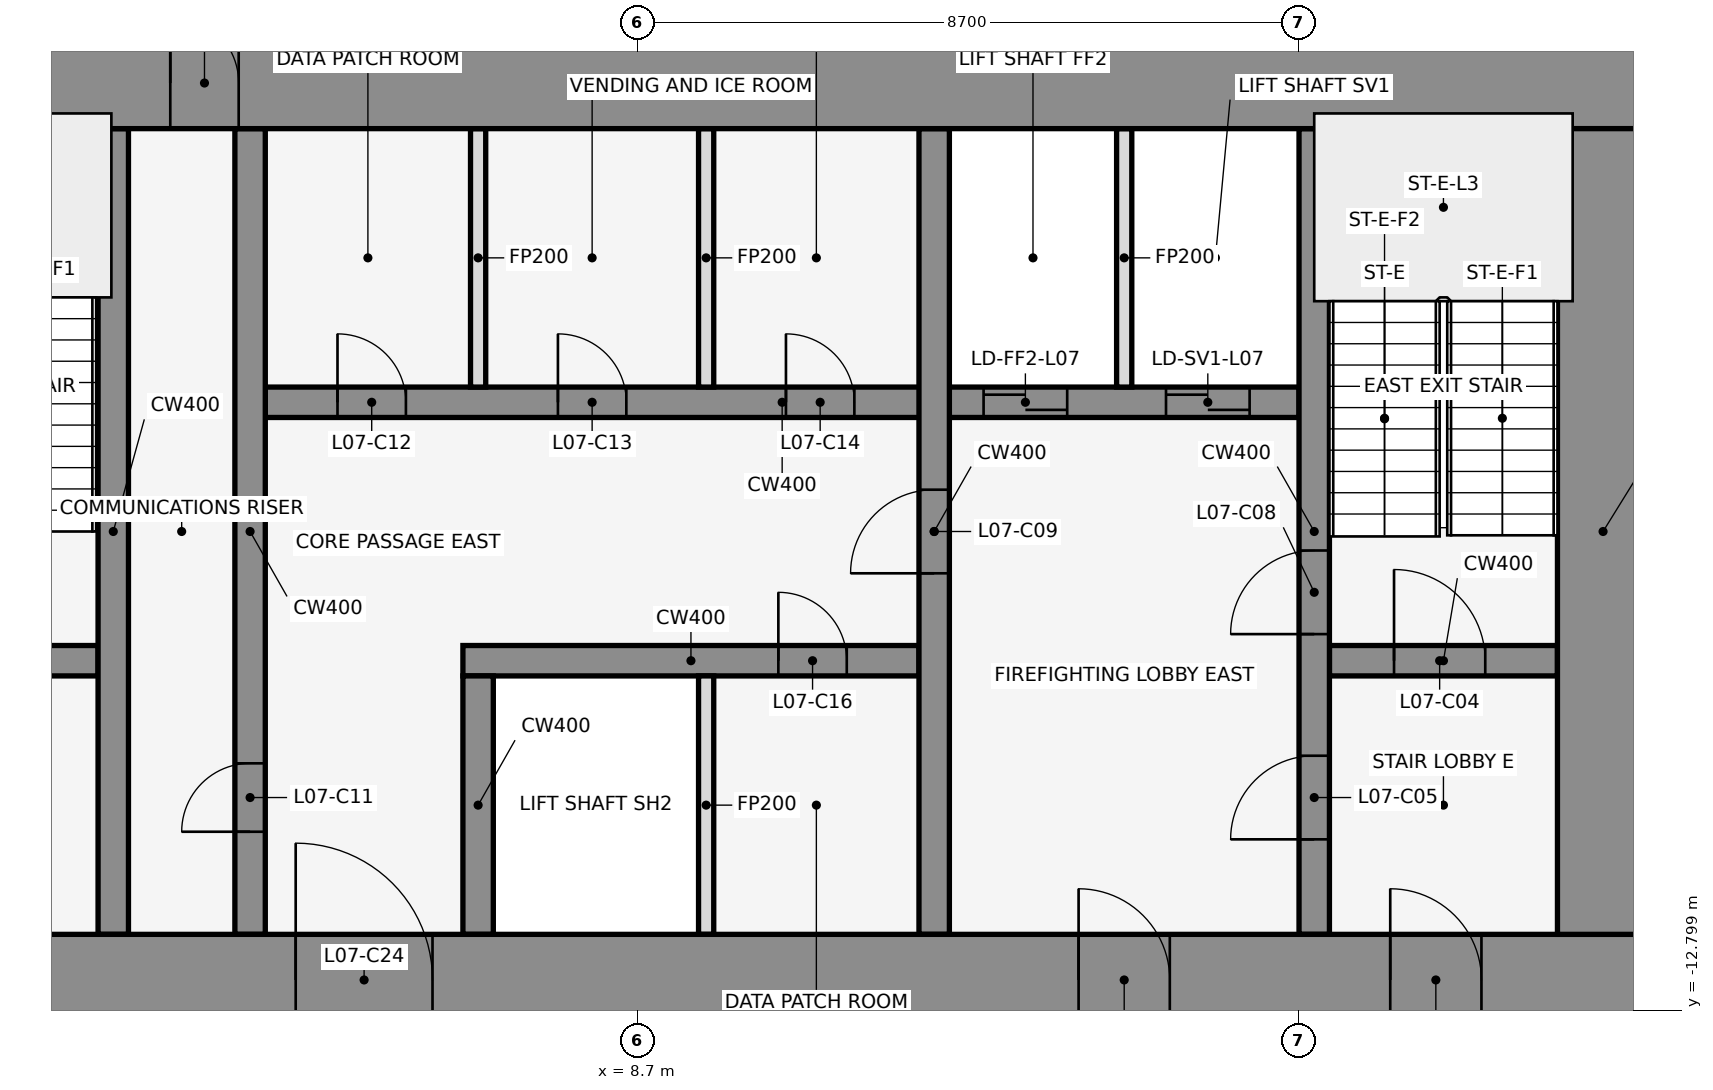
"""IFC4 building model, lengths in metres.
Left out: names, types, materials, properties, quantities, classifications, styles, units other than length and angle.
Written with IfcOpenShell. Run it as: python <this file> out.ifc"""

import sys

from ifc_helpers import new_model, si_unit, direction, frame, frame_2d, origin, place, context, subcontext, project, spatial, rectangle, extrude, element, fill, save


model = new_model("IFC4")
c1 = context("Model", 3, precision=1e-05, world=origin(), true_north=direction((0.0, 1.0)))
c2 = subcontext(c1, "Body", "Model", "MODEL_VIEW")
j1 = project(units=[si_unit("LENGTHUNIT", "METRE"), si_unit("PLANEANGLEUNIT", "RADIAN")], contexts=[c1])
p1 = place(None, origin())
s1 = spatial("IfcSite", under=j1, at=p1, CompositionType="ELEMENT")
p2 = place(p1, origin())
s2 = spatial("IfcBuilding", under=s1, at=p2, CompositionType="ELEMENT")
p3 = place(p2, frame((0.0, 0.0, 39.5)))
s3 = spatial("IfcBuildingStorey", under=s2, at=p3, CompositionType="ELEMENT", Elevation=39.5)
for number, where, z_axis, x_axis in (
    (1, (16.432, -0.105, 0.0), (0.0, 0.0, 1.0), (-0.84, 0.543, 0.0)),
    (2, (1.901, 1.08, 0.0), (0.0, 0.0, 1.0), (-0.84, -0.543, 0.0)),
):
    element("IfcWall", number, at=place(p3, frame(where, z_axis=z_axis, x_axis=x_axis)), inside=s3, PredefinedType="STANDARD", context=c2, shape_type="SweptSolid", body=[
        extrude(rectangle(XDim=2.183, YDim=0.25, at=frame_2d((1.091, 0.0))), origin(), (0.0, 0.0, 1.0), 4.35),
    ])
p4 = place(p3, frame((-1.6, -8.2, 0.0), z_axis=(0.0, 0.0, 1.0), x_axis=(1.0, 0.0, 0.0)))
e3 = element("IfcWall", 3, at=p4, inside=s3, PredefinedType="SHEAR", context=c2, shape_type="SweptSolid", body=[
    extrude(rectangle(XDim=3.2, YDim=0.4, at=frame_2d((1.6, 0.0))), origin(), (0.0, 0.0, 1.0), 4.5),
])
p5 = place(p4, frame((1.05, 0.0, 0.0)))
e4 = element("IfcOpeningElement", 4, at=p5, cuts=e3, PredefinedType="OPENING", context=c2, shape_type="SweptSolid", body=[
    extrude(rectangle(XDim=1.2, YDim=2.1, at=frame_2d((0.6, 1.05))), frame((0.0, 0.212, 0.0), z_axis=(0.0, -1.0, 0.0), x_axis=(1.0, 0.0, 0.0)), (0.0, 0.0, 1.0), 0.424),
])
p6 = place(p3, frame((6.4, -8.2, 0.0), z_axis=(0.0, 0.0, 1.0), x_axis=(1.0, 0.0, 0.0)))
e5 = element("IfcWall", 5, at=p6, inside=s3, PredefinedType="SHEAR", context=c2, shape_type="SweptSolid", body=[
    extrude(rectangle(XDim=6.0, YDim=0.4, at=frame_2d((3.0, 0.0))), origin(), (0.0, 0.0, 1.0), 4.5),
])
p7 = place(p6, frame((4.15, 0.0, 0.0)))
e6 = element("IfcOpeningElement", 6, at=p7, cuts=e5, PredefinedType="OPENING", context=c2, shape_type="SweptSolid", body=[
    extrude(rectangle(XDim=0.9, YDim=2.1, at=frame_2d((0.45, 1.05))), frame((0.0, 0.212, 0.0), z_axis=(0.0, -1.0, 0.0), x_axis=(1.0, 0.0, 0.0)), (0.0, 0.0, 1.0), 0.424),
])
p8 = place(p3, frame((17.8, -8.2, 0.0), z_axis=(0.0, 0.0, 1.0), x_axis=(1.0, 0.0, 0.0)))
e7 = element("IfcWall", 7, at=p8, inside=s3, PredefinedType="SHEAR", context=c2, shape_type="SweptSolid", body=[
    extrude(rectangle(XDim=3.0, YDim=0.4, at=frame_2d((1.5, 0.0))), origin(), (0.0, 0.0, 1.0), 4.5),
])
p9 = place(p8, frame((0.85, 0.0, 0.0)))
e8 = element("IfcOpeningElement", 8, at=p9, cuts=e7, PredefinedType="OPENING", context=c2, shape_type="SweptSolid", body=[
    extrude(rectangle(XDim=1.2, YDim=2.1, at=frame_2d((0.6, 1.05))), frame((0.0, 0.212, 0.0), z_axis=(0.0, -1.0, 0.0), x_axis=(1.0, 0.0, 0.0)), (0.0, 0.0, 1.0), 0.424),
])
p10 = place(p3, frame((3.8, -4.8, 0.0), z_axis=(0.0, 0.0, 1.0), x_axis=(1.0, 0.0, 0.0)))
e9 = element("IfcWall", 9, at=p10, inside=s3, PredefinedType="SHEAR", context=c2, shape_type="SweptSolid", body=[
    extrude(rectangle(XDim=13.6, YDim=0.4, at=frame_2d((6.8, 0.0))), origin(), (0.0, 0.0, 1.0), 4.5),
])
p11 = place(p10, frame((9.45, 0.0, 0.0)))
e10 = element("IfcOpeningElement", 10, at=p11, cuts=e9, PredefinedType="OPENING", context=c2, shape_type="SweptSolid", body=[
    extrude(rectangle(XDim=1.1, YDim=2.1, at=frame_2d((0.55, 1.05))), frame((0.0, 0.212, 0.0), z_axis=(0.0, -1.0, 0.0), x_axis=(1.0, 0.0, 0.0)), (0.0, 0.0, 1.0), 0.424),
])
p12 = place(p10, frame((11.85, 0.0, 0.0)))
e11 = element("IfcOpeningElement", 11, at=p12, cuts=e9, PredefinedType="OPENING", context=c2, shape_type="SweptSolid", body=[
    extrude(rectangle(XDim=1.1, YDim=2.1, at=frame_2d((0.55, 1.05))), frame((0.0, 0.212, 0.0), z_axis=(0.0, -1.0, 0.0), x_axis=(1.0, 0.0, 0.0)), (0.0, 0.0, 1.0), 0.424),
])
p13 = place(p10, frame((0.95, 0.0, 0.0)))
e12 = element("IfcOpeningElement", 12, at=p13, cuts=e9, PredefinedType="OPENING", context=c2, shape_type="SweptSolid", body=[
    extrude(rectangle(XDim=0.9, YDim=2.1, at=frame_2d((0.45, 1.05))), frame((0.0, 0.212, 0.0), z_axis=(0.0, -1.0, 0.0), x_axis=(1.0, 0.0, 0.0)), (0.0, 0.0, 1.0), 0.424),
])
p14 = place(p10, frame((3.85, 0.0, 0.0)))
e13 = element("IfcOpeningElement", 13, at=p14, cuts=e9, PredefinedType="OPENING", context=c2, shape_type="SweptSolid", body=[
    extrude(rectangle(XDim=0.9, YDim=2.1, at=frame_2d((0.45, 1.05))), frame((0.0, 0.212, 0.0), z_axis=(0.0, -1.0, 0.0), x_axis=(1.0, 0.0, 0.0)), (0.0, 0.0, 1.0), 0.424),
])
p15 = place(p10, frame((6.85, 0.0, 0.0)))
e14 = element("IfcOpeningElement", 14, at=p15, cuts=e9, PredefinedType="OPENING", context=c2, shape_type="SweptSolid", body=[
    extrude(rectangle(XDim=0.9, YDim=2.1, at=frame_2d((0.45, 1.05))), frame((0.0, 0.212, 0.0), z_axis=(0.0, -1.0, 0.0), x_axis=(1.0, 0.0, 0.0)), (0.0, 0.0, 1.0), 0.424),
])
p16 = place(p3, frame((1.8, -11.8, 0.0), z_axis=(0.0, 0.0, 1.0), x_axis=(0.0, 1.0, 0.0)))
e15 = element("IfcWall", 15, at=p16, inside=s3, PredefinedType="SHEAR", context=c2, shape_type="SweptSolid", body=[
    extrude(rectangle(XDim=10.6, YDim=0.4, at=frame_2d((5.3, 0.0))), origin(), (0.0, 0.0, 1.0), 4.5),
])
p17 = place(p3, frame((3.6, -11.8, 0.0), z_axis=(0.0, 0.0, 1.0), x_axis=(0.0, 1.0, 0.0)))
e16 = element("IfcWall", 16, at=p17, inside=s3, PredefinedType="SHEAR", context=c2, shape_type="SweptSolid", body=[
    extrude(rectangle(XDim=10.6, YDim=0.4, at=frame_2d((5.3, 0.0))), origin(), (0.0, 0.0, 1.0), 4.5),
])
p18 = place(p17, frame((1.35, 0.0, 0.0)))
e17 = element("IfcOpeningElement", 17, at=p18, cuts=e16, PredefinedType="OPENING", context=c2, shape_type="SweptSolid", body=[
    extrude(rectangle(XDim=0.9, YDim=2.1, at=frame_2d((0.45, 1.05))), frame((0.0, 0.212, 0.0), z_axis=(0.0, -1.0, 0.0), x_axis=(1.0, 0.0, 0.0)), (0.0, 0.0, 1.0), 0.424),
])
p19 = place(p3, frame((6.6, -11.8, 0.0), z_axis=(0.0, 0.0, 1.0), x_axis=(0.0, 1.0, 0.0)))
e18 = element("IfcWall", 18, at=p19, inside=s3, PredefinedType="SHEAR", context=c2, shape_type="SweptSolid", body=[
    extrude(rectangle(XDim=3.4, YDim=0.4, at=frame_2d((1.7, 0.0))), origin(), (0.0, 0.0, 1.0), 4.5),
])
for number, where, z_axis, x_axis in (
    (19, (6.6, -4.6, 0.0), (0.0, 0.0, 1.0), (0.0, 1.0, 0.0)),
    (20, (9.6, -11.8, 0.0), (0.0, 0.0, 1.0), (0.0, 1.0, 0.0)),
    (21, (9.6, -4.6, 0.0), (0.0, 0.0, 1.0), (0.0, 1.0, 0.0)),
):
    element("IfcWall", number, at=place(p3, frame(where, z_axis=z_axis, x_axis=x_axis)), inside=s3, PredefinedType="PARTITIONING", context=c2, shape_type="SweptSolid", body=[
        extrude(rectangle(XDim=3.4, YDim=0.2, at=frame_2d((1.7, 0.0))), origin(), (0.0, 0.0, 1.0), 3.418),
    ])
p20 = place(p3, frame((12.6, -11.8, 0.0), z_axis=(0.0, 0.0, 1.0), x_axis=(0.0, 1.0, 0.0)))
e22 = element("IfcWall", 22, at=p20, inside=s3, PredefinedType="SHEAR", context=c2, shape_type="SweptSolid", body=[
    extrude(rectangle(XDim=10.6, YDim=0.4, at=frame_2d((5.3, 0.0))), origin(), (0.0, 0.0, 1.0), 4.5),
])
p21 = place(p20, frame((4.75, 0.0, 0.0)))
e23 = element("IfcOpeningElement", 23, at=p21, cuts=e22, PredefinedType="OPENING", context=c2, shape_type="SweptSolid", body=[
    extrude(rectangle(XDim=1.1, YDim=2.1, at=frame_2d((0.55, 1.05))), frame((0.0, 0.212, 0.0), z_axis=(0.0, -1.0, 0.0), x_axis=(1.0, 0.0, 0.0)), (0.0, 0.0, 1.0), 0.424),
])
p22 = place(p3, frame((15.1, -4.6, 0.0), z_axis=(0.0, 0.0, 1.0), x_axis=(0.0, 1.0, 0.0)))
e24 = element("IfcWall", 24, at=p22, inside=s3, PredefinedType="PARTITIONING", context=c2, shape_type="SweptSolid", body=[
    extrude(rectangle(XDim=3.4, YDim=0.2, at=frame_2d((1.7, 0.0))), origin(), (0.0, 0.0, 1.0), 3.418),
])
p23 = place(p3, frame((17.6, -11.8, 0.0), z_axis=(0.0, 0.0, 1.0), x_axis=(0.0, 1.0, 0.0)))
e25 = element("IfcWall", 25, at=p23, inside=s3, PredefinedType="SHEAR", context=c2, shape_type="SweptSolid", body=[
    extrude(rectangle(XDim=10.6, YDim=0.4, at=frame_2d((5.3, 0.0))), origin(), (0.0, 0.0, 1.0), 4.5),
])
p24 = place(p23, frame((1.25, 0.0, 0.0)))
e26 = element("IfcOpeningElement", 26, at=p24, cuts=e25, PredefinedType="OPENING", context=c2, shape_type="SweptSolid", body=[
    extrude(rectangle(XDim=1.1, YDim=2.1, at=frame_2d((0.55, 1.05))), frame((0.0, 0.212, 0.0), z_axis=(0.0, -1.0, 0.0), x_axis=(1.0, 0.0, 0.0)), (0.0, 0.0, 1.0), 0.424),
])
p25 = place(p23, frame((3.95, 0.0, 0.0)))
e27 = element("IfcOpeningElement", 27, at=p25, cuts=e25, PredefinedType="OPENING", context=c2, shape_type="SweptSolid", body=[
    extrude(rectangle(XDim=1.1, YDim=2.1, at=frame_2d((0.55, 1.05))), frame((0.0, 0.212, 0.0), z_axis=(0.0, -1.0, 0.0), x_axis=(1.0, 0.0, 0.0)), (0.0, 0.0, 1.0), 0.424),
])
p26 = place(p3, frame((-22.0, -0.6, 0.0), z_axis=(0.0, 0.0, 1.0), x_axis=(1.0, 0.0, 0.0)))
e28 = element("IfcWall", 28, at=p26, inside=s3, PredefinedType="SHEAR", context=c2, shape_type="SweptSolid", body=[
    extrude(rectangle(XDim=44.0, YDim=1.2, at=frame_2d((22.0, 0.0))), origin(), (0.0, 0.0, 1.0), 4.5),
])
p27 = place(p26, frame((18.55, 0.0, 0.0)))
e29 = element("IfcOpeningElement", 29, at=p27, cuts=e28, PredefinedType="OPENING", context=c2, shape_type="SweptSolid", body=[
    extrude(rectangle(XDim=0.9, YDim=2.1, at=frame_2d((0.45, 1.05))), frame((0.0, 0.612, 0.0), z_axis=(0.0, -1.0, 0.0), x_axis=(1.0, 0.0, 0.0)), (0.0, 0.0, 1.0), 1.224),
])
p28 = place(p26, frame((24.55, 0.0, 0.0)))
e30 = element("IfcOpeningElement", 30, at=p28, cuts=e28, PredefinedType="OPENING", context=c2, shape_type="SweptSolid", body=[
    extrude(rectangle(XDim=0.9, YDim=2.1, at=frame_2d((0.45, 1.05))), frame((0.0, 0.612, 0.0), z_axis=(0.0, -1.0, 0.0), x_axis=(1.0, 0.0, 0.0)), (0.0, 0.0, 1.0), 1.224),
])
p29 = place(p3, frame((-22.0, -12.4, 0.0), z_axis=(0.0, 0.0, 1.0), x_axis=(1.0, 0.0, 0.0)))
e31 = element("IfcWall", 31, at=p29, inside=s3, PredefinedType="SHEAR", context=c2, shape_type="SweptSolid", body=[
    extrude(rectangle(XDim=44.0, YDim=1.2, at=frame_2d((22.0, 0.0))), origin(), (0.0, 0.0, 1.0), 4.5),
])
p30 = place(p29, frame((2.2, 0.0, 0.0)))
e32 = element("IfcOpeningElement", 32, at=p30, cuts=e31, PredefinedType="OPENING", context=c2, shape_type="SweptSolid", body=[
    extrude(rectangle(XDim=1.2, YDim=2.1, at=frame_2d((0.6, 1.05))), frame((0.0, 0.612, 0.0), z_axis=(0.0, -1.0, 0.0), x_axis=(1.0, 0.0, 0.0)), (0.0, 0.0, 1.0), 1.224),
])
p31 = place(p29, frame((21.4, 0.0, 0.0)))
e33 = element("IfcOpeningElement", 33, at=p31, cuts=e31, PredefinedType="OPENING", context=c2, shape_type="SweptSolid", body=[
    extrude(rectangle(XDim=1.2, YDim=2.1, at=frame_2d((0.6, 1.05))), frame((0.0, 0.612, 0.0), z_axis=(0.0, -1.0, 0.0), x_axis=(1.0, 0.0, 0.0)), (0.0, 0.0, 1.0), 1.224),
])
p32 = place(p29, frame((40.6, 0.0, 0.0)))
e34 = element("IfcOpeningElement", 34, at=p32, cuts=e31, PredefinedType="OPENING", context=c2, shape_type="SweptSolid", body=[
    extrude(rectangle(XDim=1.2, YDim=2.1, at=frame_2d((0.6, 1.05))), frame((0.0, 0.612, 0.0), z_axis=(0.0, -1.0, 0.0), x_axis=(1.0, 0.0, 0.0)), (0.0, 0.0, 1.0), 1.224),
])
p33 = place(p29, frame((16.0, 0.0, 0.0)))
e35 = element("IfcOpeningElement", 35, at=p33, cuts=e31, PredefinedType="OPENING", context=c2, shape_type="SweptSolid", body=[
    extrude(rectangle(XDim=1.8, YDim=2.1, at=frame_2d((0.9, 1.05))), frame((0.0, 0.612, 0.0), z_axis=(0.0, -1.0, 0.0), x_axis=(1.0, 0.0, 0.0)), (0.0, 0.0, 1.0), 1.224),
])
p34 = place(p29, frame((6.3, 0.0, 0.0)))
e36 = element("IfcOpeningElement", 36, at=p34, cuts=e31, PredefinedType="OPENING", context=c2, shape_type="SweptSolid", body=[
    extrude(rectangle(XDim=1.2, YDim=2.1, at=frame_2d((0.6, 1.05))), frame((0.0, 0.612, 0.0), z_axis=(0.0, -1.0, 0.0), x_axis=(1.0, 0.0, 0.0)), (0.0, 0.0, 1.0), 1.224),
])
p35 = place(p29, frame((26.2, 0.0, 0.0)))
e37 = element("IfcOpeningElement", 37, at=p35, cuts=e31, PredefinedType="OPENING", context=c2, shape_type="SweptSolid", body=[
    extrude(rectangle(XDim=1.8, YDim=2.1, at=frame_2d((0.9, 1.05))), frame((0.0, 0.612, 0.0), z_axis=(0.0, -1.0, 0.0), x_axis=(1.0, 0.0, 0.0)), (0.0, 0.0, 1.0), 1.224),
])
p36 = place(p29, frame((36.5, 0.0, 0.0)))
e38 = element("IfcOpeningElement", 38, at=p36, cuts=e31, PredefinedType="OPENING", context=c2, shape_type="SweptSolid", body=[
    extrude(rectangle(XDim=1.2, YDim=2.1, at=frame_2d((0.6, 1.05))), frame((0.0, 0.612, 0.0), z_axis=(0.0, -1.0, 0.0), x_axis=(1.0, 0.0, 0.0)), (0.0, 0.0, 1.0), 1.224),
])
p37 = place(p3, frame((21.4, -11.8, 0.0), z_axis=(0.0, 0.0, 1.0), x_axis=(0.0, 1.0, 0.0)))
e39 = element("IfcWall", 39, at=p37, inside=s3, PredefinedType="SHEAR", context=c2, shape_type="SweptSolid", body=[
    extrude(rectangle(XDim=10.6, YDim=1.2, at=frame_2d((5.3, 0.0))), origin(), (0.0, 0.0, 1.0), 4.5),
])
p38 = place(p9, origin())
e40 = element("IfcDoor", 40, at=p38, inside=s3, OperationType="SINGLE_SWING_RIGHT", PredefinedType="DOOR", context=c2, shape_type="SweptSolid", body=[
    extrude(rectangle(XDim=1.2, YDim=2.1, at=frame_2d((0.6, 1.05))), frame((0.0, 0.025, 0.0), z_axis=(0.0, -1.0, 0.0), x_axis=(1.0, 0.0, 0.0)), (0.0, 0.0, 1.0), 0.05),
])
fill(e8, e40)
p39 = place(p24, origin())
e41 = element("IfcDoor", 41, at=p39, inside=s3, OperationType="SINGLE_SWING_LEFT", PredefinedType="DOOR", context=c2, shape_type="SweptSolid", body=[
    extrude(rectangle(XDim=1.1, YDim=2.1, at=frame_2d((0.55, 1.05))), frame((0.0, 0.025, 0.0), z_axis=(0.0, -1.0, 0.0), x_axis=(1.0, 0.0, 0.0)), (0.0, 0.0, 1.0), 0.05),
])
fill(e26, e41)
p40 = place(p11, origin())
e42 = element("IfcDoor", 42, at=p40, inside=s3, OperationType="DOUBLE_DOOR_SLIDING", PredefinedType="DOOR", context=c2, shape_type="SweptSolid", body=[
    extrude(rectangle(XDim=1.1, YDim=2.1, at=frame_2d((0.55, 1.05))), frame((0.0, 0.025, 0.0), z_axis=(0.0, -1.0, 0.0), x_axis=(1.0, 0.0, 0.0)), (0.0, 0.0, 1.0), 0.05),
])
fill(e10, e42)
p41 = place(p12, origin())
e43 = element("IfcDoor", 43, at=p41, inside=s3, OperationType="DOUBLE_DOOR_SLIDING", PredefinedType="DOOR", context=c2, shape_type="SweptSolid", body=[
    extrude(rectangle(XDim=1.1, YDim=2.1, at=frame_2d((0.55, 1.05))), frame((0.0, 0.025, 0.0), z_axis=(0.0, -1.0, 0.0), x_axis=(1.0, 0.0, 0.0)), (0.0, 0.0, 1.0), 0.05),
])
fill(e11, e43)
p42 = place(p25, origin())
e44 = element("IfcDoor", 44, at=p42, inside=s3, OperationType="SINGLE_SWING_RIGHT", PredefinedType="DOOR", context=c2, shape_type="SweptSolid", body=[
    extrude(rectangle(XDim=1.1, YDim=2.1, at=frame_2d((0.55, 1.05))), frame((0.0, 0.025, 0.0), z_axis=(0.0, -1.0, 0.0), x_axis=(1.0, 0.0, 0.0)), (0.0, 0.0, 1.0), 0.05),
])
fill(e27, e44)
p43 = place(p21, frame((1.1, 0.0, 0.0), z_axis=(0.0, 0.0, 1.0), x_axis=(-1.0, 0.0, 0.0)))
e45 = element("IfcDoor", 45, at=p43, inside=s3, OperationType="SINGLE_SWING_RIGHT", PredefinedType="DOOR", context=c2, shape_type="SweptSolid", body=[
    extrude(rectangle(XDim=1.1, YDim=2.1, at=frame_2d((0.55, 1.05))), frame((0.0, 0.025, 0.0), z_axis=(0.0, -1.0, 0.0), x_axis=(1.0, 0.0, 0.0)), (0.0, 0.0, 1.0), 0.05),
])
fill(e23, e45)
p44 = place(p18, origin())
e46 = element("IfcDoor", 46, at=p44, inside=s3, OperationType="SINGLE_SWING_LEFT", PredefinedType="DOOR", context=c2, shape_type="SweptSolid", body=[
    extrude(rectangle(XDim=0.9, YDim=2.1, at=frame_2d((0.45, 1.05))), frame((0.0, 0.025, 0.0), z_axis=(0.0, -1.0, 0.0), x_axis=(1.0, 0.0, 0.0)), (0.0, 0.0, 1.0), 0.05),
])
fill(e17, e46)
p45 = place(p13, origin())
e47 = element("IfcDoor", 47, at=p45, inside=s3, OperationType="SINGLE_SWING_RIGHT", PredefinedType="DOOR", context=c2, shape_type="SweptSolid", body=[
    extrude(rectangle(XDim=0.9, YDim=2.1, at=frame_2d((0.45, 1.05))), frame((0.0, 0.025, 0.0), z_axis=(0.0, -1.0, 0.0), x_axis=(1.0, 0.0, 0.0)), (0.0, 0.0, 1.0), 0.05),
])
fill(e12, e47)
p46 = place(p14, origin())
e48 = element("IfcDoor", 48, at=p46, inside=s3, OperationType="SINGLE_SWING_LEFT", PredefinedType="DOOR", context=c2, shape_type="SweptSolid", body=[
    extrude(rectangle(XDim=0.9, YDim=2.1, at=frame_2d((0.45, 1.05))), frame((0.0, 0.025, 0.0), z_axis=(0.0, -1.0, 0.0), x_axis=(1.0, 0.0, 0.0)), (0.0, 0.0, 1.0), 0.05),
])
fill(e13, e48)
p47 = place(p15, origin())
e49 = element("IfcDoor", 49, at=p47, inside=s3, OperationType="SINGLE_SWING_RIGHT", PredefinedType="DOOR", context=c2, shape_type="SweptSolid", body=[
    extrude(rectangle(XDim=0.9, YDim=2.1, at=frame_2d((0.45, 1.05))), frame((0.0, 0.025, 0.0), z_axis=(0.0, -1.0, 0.0), x_axis=(1.0, 0.0, 0.0)), (0.0, 0.0, 1.0), 0.05),
])
fill(e14, e49)
p48 = place(p7, frame((0.9, 0.0, 0.0), z_axis=(0.0, 0.0, 1.0), x_axis=(-1.0, 0.0, 0.0)))
e50 = element("IfcDoor", 50, at=p48, inside=s3, OperationType="SINGLE_SWING_LEFT", PredefinedType="DOOR", context=c2, shape_type="SweptSolid", body=[
    extrude(rectangle(XDim=0.9, YDim=2.1, at=frame_2d((0.45, 1.05))), frame((0.0, 0.025, 0.0), z_axis=(0.0, -1.0, 0.0), x_axis=(1.0, 0.0, 0.0)), (0.0, 0.0, 1.0), 0.05),
])
fill(e6, e50)
p49 = place(p28, origin())
e51 = element("IfcDoor", 51, at=p49, inside=s3, OperationType="SINGLE_SWING_LEFT", PredefinedType="DOOR", context=c2, shape_type="SweptSolid", body=[
    extrude(rectangle(XDim=0.9, YDim=2.1, at=frame_2d((0.45, 1.05))), frame((0.0, 0.025, 0.0), z_axis=(0.0, -1.0, 0.0), x_axis=(1.0, 0.0, 0.0)), (0.0, 0.0, 1.0), 0.05),
])
fill(e30, e51)
p50 = place(p32, frame((1.2, 0.0, 0.0), z_axis=(0.0, 0.0, 1.0), x_axis=(-1.0, 0.0, 0.0)))
e52 = element("IfcDoor", 52, at=p50, inside=s3, OperationType="SINGLE_SWING_RIGHT", PredefinedType="DOOR", context=c2, shape_type="SweptSolid", body=[
    extrude(rectangle(XDim=1.2, YDim=2.1, at=frame_2d((0.6, 1.05))), frame((0.0, 0.025, 0.0), z_axis=(0.0, -1.0, 0.0), x_axis=(1.0, 0.0, 0.0)), (0.0, 0.0, 1.0), 0.05),
])
fill(e34, e52)
p51 = place(p35, origin())
e53 = element("IfcDoor", 53, at=p51, inside=s3, OperationType="SINGLE_SWING_LEFT", PredefinedType="DOOR", context=c2, shape_type="SweptSolid", body=[
    extrude(rectangle(XDim=1.8, YDim=2.1, at=frame_2d((0.9, 1.05))), frame((0.0, 0.025, 0.0), z_axis=(0.0, -1.0, 0.0), x_axis=(1.0, 0.0, 0.0)), (0.0, 0.0, 1.0), 0.05),
])
fill(e37, e53)
p52 = place(p36, frame((1.2, 0.0, 0.0), z_axis=(0.0, 0.0, 1.0), x_axis=(-1.0, 0.0, 0.0)))
e54 = element("IfcDoor", 54, at=p52, inside=s3, OperationType="SINGLE_SWING_RIGHT", PredefinedType="DOOR", context=c2, shape_type="SweptSolid", body=[
    extrude(rectangle(XDim=1.2, YDim=2.1, at=frame_2d((0.6, 1.05))), frame((0.0, 0.025, 0.0), z_axis=(0.0, -1.0, 0.0), x_axis=(1.0, 0.0, 0.0)), (0.0, 0.0, 1.0), 0.05),
])
fill(e38, e54)
save(model, sys.argv[1])
